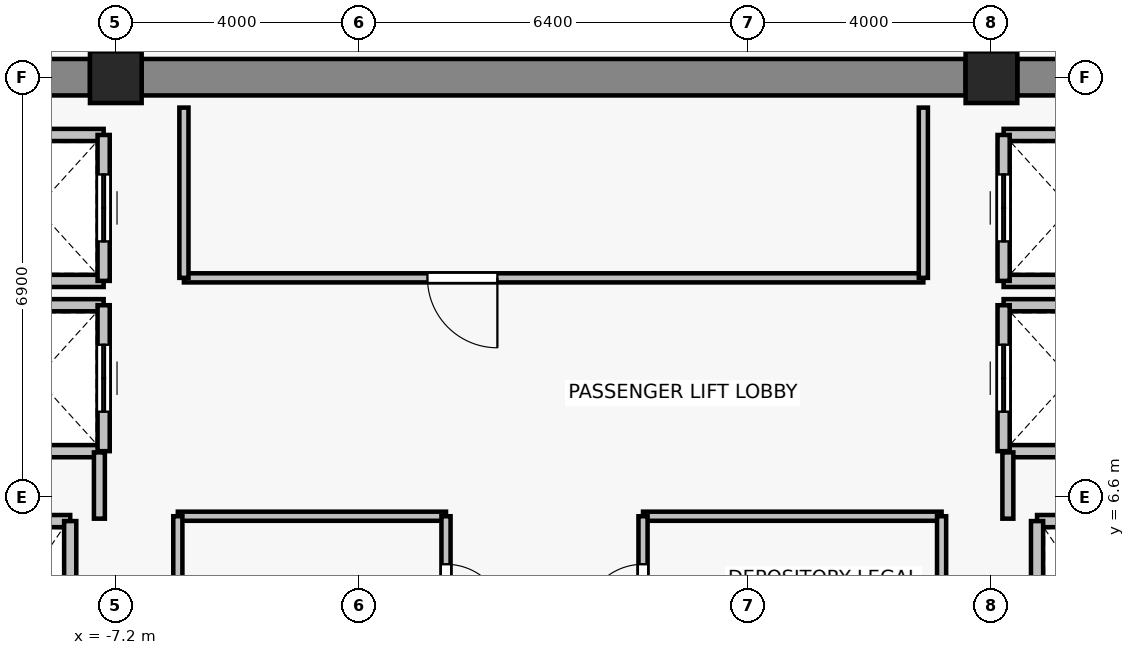
"""IFC4 building model, lengths in metres.
Left out: names, types, materials, properties, quantities, classifications, styles, units other than length and angle.
Written with IfcOpenShell. Run it as: python <this file> out.ifc"""

import sys

from ifc_helpers import new_model, si_unit, direction, frame, frame_2d, origin, origin_2d, place, context, subcontext, project, spatial, rectangle, extrude, source, transform, mapped, element, fill, save


model = new_model("IFC4")
c1 = context("Model", 3, precision=1e-05, world=origin(), true_north=direction((0.0, 1.0)))
c2 = subcontext(c1, "Body", "Model", "MODEL_VIEW")
j1 = project(units=[si_unit("LENGTHUNIT", "METRE"), si_unit("PLANEANGLEUNIT", "RADIAN")], contexts=[c1])
p1 = place(None, origin())
s1 = spatial("IfcSite", under=j1, at=p1, CompositionType="ELEMENT")
p2 = place(p1, origin())
s2 = spatial("IfcBuilding", under=s1, at=p2, CompositionType="ELEMENT")
p3 = place(p2, frame((0.0, 0.0, 238.6)))
s3 = spatial("IfcBuildingStorey", under=s2, at=p3, CompositionType="ELEMENT", Elevation=238.6)
for number, where, z_axis, x_axis in (
    (1, (-7.2, 13.5, 0.0), (0.0, 0.0, 1.0), (1.0, 0.0, 0.0)),
    (2, (7.2, 13.5, 0.0), (0.0, 0.0, 1.0), (1.0, 0.0, 0.0)),
):
    element("IfcColumn", number, at=place(p3, frame(where, z_axis=z_axis, x_axis=x_axis)), inside=s3, PredefinedType="COLUMN", context=c2, shape_type="SweptSolid", body=[
        extrude(rectangle(XDim=0.85, YDim=0.85, at=origin_2d()), origin(), (0.0, 0.0, 1.0), 3.3),
    ])
p4 = place(p3, frame((-13.975, 13.5, 0.0), z_axis=(0.0, 0.0, 1.0), x_axis=(1.0, 0.0, 0.0)))
e3 = element("IfcWall", 3, at=p4, inside=s3, PredefinedType="SHEAR", context=c2, shape_type="SweptSolid", body=[
    extrude(rectangle(XDim=6.35, YDim=0.6, at=frame_2d((3.175, 0.0))), origin(), (0.0, 0.0, 1.0), 3.075),
])
p5 = place(p3, frame((-6.775, 13.5, 0.0), z_axis=(0.0, 0.0, 1.0), x_axis=(1.0, 0.0, 0.0)))
e4 = element("IfcWall", 4, at=p5, inside=s3, PredefinedType="SHEAR", context=c2, shape_type="SweptSolid", body=[
    extrude(rectangle(XDim=13.55, YDim=0.6, at=frame_2d((6.775, 0.0))), origin(), (0.0, 0.0, 1.0), 3.075),
])
p6 = place(p3, frame((7.625, 13.5, 0.0), z_axis=(0.0, 0.0, 1.0), x_axis=(1.0, 0.0, 0.0)))
e5 = element("IfcWall", 5, at=p6, inside=s3, PredefinedType="SHEAR", context=c2, shape_type="SweptSolid", body=[
    extrude(rectangle(XDim=6.35, YDim=0.6, at=frame_2d((3.175, 0.0))), origin(), (0.0, 0.0, 1.0), 3.075),
])
p7 = place(p3, frame((-9.95, 6.2, 0.0), z_axis=(0.0, 0.0, 1.0), x_axis=(1.0, 0.0, 0.0)))
e6 = element("IfcWall", 6, at=p7, inside=s3, PredefinedType="SOLIDWALL", context=c2, shape_type="SweptSolid", body=[
    extrude(rectangle(XDim=2.0, YDim=0.2, at=frame_2d((1.0, 0.0))), origin(), (0.0, 0.0, 1.0), 3.075),
])
p8 = place(p3, frame((-7.95, 6.2, 0.0), z_axis=(0.0, 0.0, 1.0), x_axis=(0.0, -1.0, 0.0)))
e7 = element("IfcWall", 7, at=p8, inside=s3, PredefinedType="SOLIDWALL", context=c2, shape_type="SweptSolid", body=[
    extrude(rectangle(XDim=2.8, YDim=0.2, at=frame_2d((1.4, 0.0))), origin(), (0.0, 0.0, 1.0), 3.075),
])
p9 = place(p3, frame((7.95, 6.2, 0.0), z_axis=(0.0, 0.0, 1.0), x_axis=(1.0, 0.0, 0.0)))
e8 = element("IfcWall", 8, at=p9, inside=s3, PredefinedType="SOLIDWALL", context=c2, shape_type="SweptSolid", body=[
    extrude(rectangle(XDim=2.0, YDim=0.2, at=frame_2d((1.0, 0.0))), origin(), (0.0, 0.0, 1.0), 3.075),
])
p10 = place(p3, frame((7.95, 3.4, 0.0), z_axis=(0.0, 0.0, 1.0), x_axis=(0.0, 1.0, 0.0)))
e9 = element("IfcWall", 9, at=p10, inside=s3, PredefinedType="SOLIDWALL", context=c2, shape_type="SweptSolid", body=[
    extrude(rectangle(XDim=2.8, YDim=0.2, at=frame_2d((1.4, 0.0))), origin(), (0.0, 0.0, 1.0), 3.075),
])
for number, where, z_axis, x_axis in (
    (10, (-7.4, 7.35, 0.0), (0.0, 0.0, 1.0), (-1.0, 0.0, 0.0)),
    (11, (-9.6, 9.75, 0.0), (0.0, 0.0, 1.0), (1.0, 0.0, 0.0)),
):
    element("IfcWall", number, at=place(p3, frame(where, z_axis=z_axis, x_axis=x_axis)), inside=s3, PredefinedType="SOLIDWALL", context=c2, shape_type="SweptSolid", body=[
        extrude(rectangle(XDim=2.2, YDim=0.2, at=frame_2d((1.1, 0.0))), origin(), (0.0, 0.0, 1.0), 2.615),
    ])
p11 = place(p3, frame((-7.4, 9.75, 0.0), z_axis=(0.0, 0.0, 1.0), x_axis=(0.0, -1.0, 0.0)))
e12 = element("IfcWall", 12, at=p11, inside=s3, PredefinedType="SOLIDWALL", context=c2, shape_type="SweptSolid", body=[
    extrude(rectangle(XDim=2.4, YDim=0.2, at=frame_2d((1.2, 0.0))), origin(), (0.0, 0.0, 1.0), 2.615),
])
p12 = place(p11, frame((0.65, 0.0, 0.0)))
e13 = element("IfcOpeningElement", 13, at=p12, cuts=e12, PredefinedType="OPENING", context=c2, shape_type="SweptSolid", body=[
    extrude(rectangle(XDim=1.1, YDim=2.2, at=frame_2d((0.55, 1.1))), frame((0.0, 0.11, 0.0), z_axis=(0.0, -1.0, 0.0), x_axis=(1.0, 0.0, 0.0)), (0.0, 0.0, 1.0), 0.22),
])
for number, where, z_axis, x_axis in (
    (14, (-7.4, 10.15, 0.0), (0.0, 0.0, 1.0), (-1.0, 0.0, 0.0)),
    (15, (-9.6, 12.55, 0.0), (0.0, 0.0, 1.0), (1.0, 0.0, 0.0)),
):
    element("IfcWall", number, at=place(p3, frame(where, z_axis=z_axis, x_axis=x_axis)), inside=s3, PredefinedType="SOLIDWALL", context=c2, shape_type="SweptSolid", body=[
        extrude(rectangle(XDim=2.2, YDim=0.2, at=frame_2d((1.1, 0.0))), origin(), (0.0, 0.0, 1.0), 2.615),
    ])
p13 = place(p3, frame((-7.4, 12.55, 0.0), z_axis=(0.0, 0.0, 1.0), x_axis=(0.0, -1.0, 0.0)))
e16 = element("IfcWall", 16, at=p13, inside=s3, PredefinedType="SOLIDWALL", context=c2, shape_type="SweptSolid", body=[
    extrude(rectangle(XDim=2.4, YDim=0.2, at=frame_2d((1.2, 0.0))), origin(), (0.0, 0.0, 1.0), 2.615),
])
p14 = place(p13, frame((0.65, 0.0, 0.0)))
e17 = element("IfcOpeningElement", 17, at=p14, cuts=e16, PredefinedType="OPENING", context=c2, shape_type="SweptSolid", body=[
    extrude(rectangle(XDim=1.1, YDim=2.2, at=frame_2d((0.55, 1.1))), frame((0.0, 0.11, 0.0), z_axis=(0.0, -1.0, 0.0), x_axis=(1.0, 0.0, 0.0)), (0.0, 0.0, 1.0), 0.22),
])
for number, where, z_axis, x_axis in (
    (18, (9.6, 7.35, 0.0), (0.0, 0.0, 1.0), (-1.0, 0.0, 0.0)),
    (19, (7.4, 9.75, 0.0), (0.0, 0.0, 1.0), (1.0, 0.0, 0.0)),
):
    element("IfcWall", number, at=place(p3, frame(where, z_axis=z_axis, x_axis=x_axis)), inside=s3, PredefinedType="SOLIDWALL", context=c2, shape_type="SweptSolid", body=[
        extrude(rectangle(XDim=2.2, YDim=0.2, at=frame_2d((1.1, 0.0))), origin(), (0.0, 0.0, 1.0), 2.615),
    ])
p15 = place(p3, frame((7.4, 7.35, 0.0), z_axis=(0.0, 0.0, 1.0), x_axis=(0.0, 1.0, 0.0)))
e20 = element("IfcWall", 20, at=p15, inside=s3, PredefinedType="SOLIDWALL", context=c2, shape_type="SweptSolid", body=[
    extrude(rectangle(XDim=2.4, YDim=0.2, at=frame_2d((1.2, 0.0))), origin(), (0.0, 0.0, 1.0), 2.615),
])
p16 = place(p15, frame((0.65, 0.0, 0.0)))
e21 = element("IfcOpeningElement", 21, at=p16, cuts=e20, PredefinedType="OPENING", context=c2, shape_type="SweptSolid", body=[
    extrude(rectangle(XDim=1.1, YDim=2.2, at=frame_2d((0.55, 1.1))), frame((0.0, 0.11, 0.0), z_axis=(0.0, -1.0, 0.0), x_axis=(1.0, 0.0, 0.0)), (0.0, 0.0, 1.0), 0.22),
])
for number, where, z_axis, x_axis in (
    (22, (9.6, 10.15, 0.0), (0.0, 0.0, 1.0), (-1.0, 0.0, 0.0)),
    (23, (7.4, 12.55, 0.0), (0.0, 0.0, 1.0), (1.0, 0.0, 0.0)),
):
    element("IfcWall", number, at=place(p3, frame(where, z_axis=z_axis, x_axis=x_axis)), inside=s3, PredefinedType="SOLIDWALL", context=c2, shape_type="SweptSolid", body=[
        extrude(rectangle(XDim=2.2, YDim=0.2, at=frame_2d((1.1, 0.0))), origin(), (0.0, 0.0, 1.0), 2.615),
    ])
p17 = place(p3, frame((7.4, 10.15, 0.0), z_axis=(0.0, 0.0, 1.0), x_axis=(0.0, 1.0, 0.0)))
e24 = element("IfcWall", 24, at=p17, inside=s3, PredefinedType="SOLIDWALL", context=c2, shape_type="SweptSolid", body=[
    extrude(rectangle(XDim=2.4, YDim=0.2, at=frame_2d((1.2, 0.0))), origin(), (0.0, 0.0, 1.0), 2.615),
])
p18 = place(p17, frame((0.65, 0.0, 0.0)))
e25 = element("IfcOpeningElement", 25, at=p18, cuts=e24, PredefinedType="OPENING", context=c2, shape_type="SweptSolid", body=[
    extrude(rectangle(XDim=1.1, YDim=2.2, at=frame_2d((0.55, 1.1))), frame((0.0, 0.11, 0.0), z_axis=(0.0, -1.0, 0.0), x_axis=(1.0, 0.0, 0.0)), (0.0, 0.0, 1.0), 0.22),
])
for number, where, z_axis, x_axis in (
    (26, (-7.47, 7.33, 0.0), (0.0, 0.0, 1.0), (0.0, -1.0, 0.0)),
    (27, (7.47, 6.24, 0.0), (0.0, 0.0, 1.0), (0.0, 1.0, 0.0)),
):
    element("IfcWall", number, at=place(p3, frame(where, z_axis=z_axis, x_axis=x_axis)), inside=s3, PredefinedType="PARTITIONING", context=c2, shape_type="SweptSolid", body=[
        extrude(rectangle(XDim=1.09, YDim=0.18, at=frame_2d((0.545, 0.0))), origin(), (0.0, 0.0, 1.0), 2.615),
    ])
p19 = place(p3, frame((6.08, 10.2, 0.0), z_axis=(0.0, 0.0, 1.0), x_axis=(-1.0, 0.0, 0.0)))
e28 = element("IfcWall", 28, at=p19, inside=s3, PredefinedType="PARTITIONING", context=c2, shape_type="SweptSolid", body=[
    extrude(rectangle(XDim=12.16, YDim=0.15, at=frame_2d((6.08, 0.0))), origin(), (0.0, 0.0, 1.0), 3.075),
])
p20 = place(p19, frame((7.005, 0.0, 0.0)))
e29 = element("IfcOpeningElement", 29, at=p20, cuts=e28, PredefinedType="OPENING", context=c2, shape_type="SweptSolid", body=[
    extrude(rectangle(XDim=1.15, YDim=2.15, at=frame_2d((0.575, 1.075))), frame((0.0, 0.085, 0.0), z_axis=(0.0, -1.0, 0.0), x_axis=(1.0, 0.0, 0.0)), (0.0, 0.0, 1.0), 0.17),
])
for number, where, z_axis, x_axis in (
    (30, (-6.08, 10.2, 0.0), (0.0, 0.0, 1.0), (0.0, 1.0, 0.0)),
    (31, (6.08, 13.0, 0.0), (0.0, 0.0, 1.0), (0.0, -1.0, 0.0)),
):
    element("IfcWall", number, at=place(p3, frame(where, z_axis=z_axis, x_axis=x_axis)), inside=s3, PredefinedType="PARTITIONING", context=c2, shape_type="SweptSolid", body=[
        extrude(rectangle(XDim=2.8, YDim=0.15, at=frame_2d((1.4, 0.0))), origin(), (0.0, 0.0, 1.0), 3.075),
    ])
p21 = place(p3, frame((-6.18, 6.28, 0.0), z_axis=(0.0, 0.0, 1.0), x_axis=(1.0, 0.0, 0.0)))
e32 = element("IfcWall", 32, at=p21, inside=s3, PredefinedType="PARTITIONING", context=c2, shape_type="SweptSolid", body=[
    extrude(rectangle(XDim=4.41, YDim=0.15, at=frame_2d((2.205, 0.0))), origin(), (0.0, 0.0, 1.0), 3.075),
])
p22 = place(p3, frame((-6.18, 3.76, 0.0), z_axis=(0.0, 0.0, 1.0), x_axis=(0.0, 1.0, 0.0)))
e33 = element("IfcWall", 33, at=p22, inside=s3, PredefinedType="PARTITIONING", context=c2, shape_type="SweptSolid", body=[
    extrude(rectangle(XDim=2.52, YDim=0.15, at=frame_2d((1.26, 0.0))), origin(), (0.0, 0.0, 1.0), 3.075),
])
p23 = place(p3, frame((-1.77, 6.28, 0.0), z_axis=(0.0, 0.0, 1.0), x_axis=(0.0, -1.0, 0.0)))
e34 = element("IfcWall", 34, at=p23, inside=s3, PredefinedType="PARTITIONING", context=c2, shape_type="SweptSolid", body=[
    extrude(rectangle(XDim=2.52, YDim=0.15, at=frame_2d((1.26, 0.0))), origin(), (0.0, 0.0, 1.0), 3.075),
])
p24 = place(p23, frame((0.79, 0.0, 0.0)))
e35 = element("IfcOpeningElement", 35, at=p24, cuts=e34, PredefinedType="OPENING", context=c2, shape_type="SweptSolid", body=[
    extrude(rectangle(XDim=0.98, YDim=2.15, at=frame_2d((0.49, 1.075))), frame((0.0, 0.085, 0.0), z_axis=(0.0, -1.0, 0.0), x_axis=(1.0, 0.0, 0.0)), (0.0, 0.0, 1.0), 0.17),
])
p25 = place(p3, frame((1.47, 6.28, 0.0), z_axis=(0.0, 0.0, 1.0), x_axis=(1.0, 0.0, 0.0)))
e36 = element("IfcWall", 36, at=p25, inside=s3, PredefinedType="PARTITIONING", context=c2, shape_type="SweptSolid", body=[
    extrude(rectangle(XDim=4.91, YDim=0.15, at=frame_2d((2.455, 0.0))), origin(), (0.0, 0.0, 1.0), 3.075),
])
p26 = place(p3, frame((1.47, 3.76, 0.0), z_axis=(0.0, 0.0, 1.0), x_axis=(0.0, 1.0, 0.0)))
e37 = element("IfcWall", 37, at=p26, inside=s3, PredefinedType="PARTITIONING", context=c2, shape_type="SweptSolid", body=[
    extrude(rectangle(XDim=2.52, YDim=0.15, at=frame_2d((1.26, 0.0))), origin(), (0.0, 0.0, 1.0), 3.075),
])
p27 = place(p26, frame((0.75, 0.0, 0.0)))
e38 = element("IfcOpeningElement", 38, at=p27, cuts=e37, PredefinedType="OPENING", context=c2, shape_type="SweptSolid", body=[
    extrude(rectangle(XDim=0.98, YDim=2.15, at=frame_2d((0.49, 1.075))), frame((0.0, 0.085, 0.0), z_axis=(0.0, -1.0, 0.0), x_axis=(1.0, 0.0, 0.0)), (0.0, 0.0, 1.0), 0.17),
])
p28 = place(p3, frame((6.38, 6.28, 0.0), z_axis=(0.0, 0.0, 1.0), x_axis=(0.0, -1.0, 0.0)))
e39 = element("IfcWall", 39, at=p28, inside=s3, PredefinedType="PARTITIONING", context=c2, shape_type="SweptSolid", body=[
    extrude(rectangle(XDim=2.52, YDim=0.15, at=frame_2d((1.26, 0.0))), origin(), (0.0, 0.0, 1.0), 3.075),
])
m1 = source(origin(), c2, "Body", "SweptSolid", [
    extrude(rectangle(XDim=1.1, YDim=2.2, at=frame_2d((0.55, 1.1))), frame((0.0, 0.025, 0.0), z_axis=(0.0, -1.0, 0.0), x_axis=(1.0, 0.0, 0.0)), (0.0, 0.0, 1.0), 0.05),
])
p29 = place(p12, origin())
e40 = element("IfcDoor", 40, at=p29, inside=s3, OperationType="DOUBLE_DOOR_SLIDING", PredefinedType="DOOR", context=c2, shape_type="MappedRepresentation", body=[
    mapped(m1, transform((0.0, 0.0, 0.0), x_axis=(1.0, 0.0, 0.0), y_axis=(0.0, 1.0, 0.0), z_axis=(0.0, 0.0, 1.0), scale=1.0)),
])
fill(e13, e40)
p30 = place(p14, origin())
e41 = element("IfcDoor", 41, at=p30, inside=s3, OperationType="DOUBLE_DOOR_SLIDING", PredefinedType="DOOR", context=c2, shape_type="MappedRepresentation", body=[
    mapped(m1, transform((0.0, 0.0, 0.0), x_axis=(1.0, 0.0, 0.0), y_axis=(0.0, 1.0, 0.0), z_axis=(0.0, 0.0, 1.0), scale=1.0)),
])
fill(e17, e41)
p31 = place(p16, origin())
e42 = element("IfcDoor", 42, at=p31, inside=s3, OperationType="DOUBLE_DOOR_SLIDING", PredefinedType="DOOR", context=c2, shape_type="MappedRepresentation", body=[
    mapped(m1, transform((0.0, 0.0, 0.0), x_axis=(1.0, 0.0, 0.0), y_axis=(0.0, 1.0, 0.0), z_axis=(0.0, 0.0, 1.0), scale=1.0)),
])
fill(e21, e42)
p32 = place(p18, origin())
e43 = element("IfcDoor", 43, at=p32, inside=s3, OperationType="DOUBLE_DOOR_SLIDING", PredefinedType="DOOR", context=c2, shape_type="MappedRepresentation", body=[
    mapped(m1, transform((0.0, 0.0, 0.0), x_axis=(1.0, 0.0, 0.0), y_axis=(0.0, 1.0, 0.0), z_axis=(0.0, 0.0, 1.0), scale=1.0)),
])
fill(e25, e43)
m2 = source(origin(), c2, "Body", "SweptSolid", [
    extrude(rectangle(XDim=1.15, YDim=2.15, at=frame_2d((0.575, 1.075))), frame((0.0, 0.025, 0.0), z_axis=(0.0, -1.0, 0.0), x_axis=(1.0, 0.0, 0.0)), (0.0, 0.0, 1.0), 0.05),
])
p33 = place(p20, origin())
e44 = element("IfcDoor", 44, at=p33, inside=s3, OperationType="SINGLE_SWING_LEFT", PredefinedType="DOOR", context=c2, shape_type="MappedRepresentation", body=[
    mapped(m2, transform((0.0, 0.0, 0.0), x_axis=(1.0, 0.0, 0.0), y_axis=(0.0, 1.0, 0.0), z_axis=(0.0, 0.0, 1.0), scale=1.0)),
])
fill(e29, e44)
m3 = source(origin(), c2, "Body", "SweptSolid", [
    extrude(rectangle(XDim=0.98, YDim=2.15, at=frame_2d((0.49, 1.075))), frame((0.0, 0.025, 0.0), z_axis=(0.0, -1.0, 0.0), x_axis=(1.0, 0.0, 0.0)), (0.0, 0.0, 1.0), 0.05),
])
p34 = place(p24, origin())
e45 = element("IfcDoor", 45, at=p34, inside=s3, OperationType="SINGLE_SWING_RIGHT", PredefinedType="DOOR", context=c2, shape_type="MappedRepresentation", body=[
    mapped(m3, transform((0.0, 0.0, 0.0), x_axis=(1.0, 0.0, 0.0), y_axis=(0.0, 1.0, 0.0), z_axis=(0.0, 0.0, 1.0), scale=1.0)),
])
fill(e35, e45)
p35 = place(p27, origin())
e46 = element("IfcDoor", 46, at=p35, inside=s3, OperationType="SINGLE_SWING_LEFT", PredefinedType="DOOR", context=c2, shape_type="MappedRepresentation", body=[
    mapped(m3, transform((0.0, 0.0, 0.0), x_axis=(1.0, 0.0, 0.0), y_axis=(0.0, 1.0, 0.0), z_axis=(0.0, 0.0, 1.0), scale=1.0)),
])
fill(e38, e46)
save(model, sys.argv[1])
